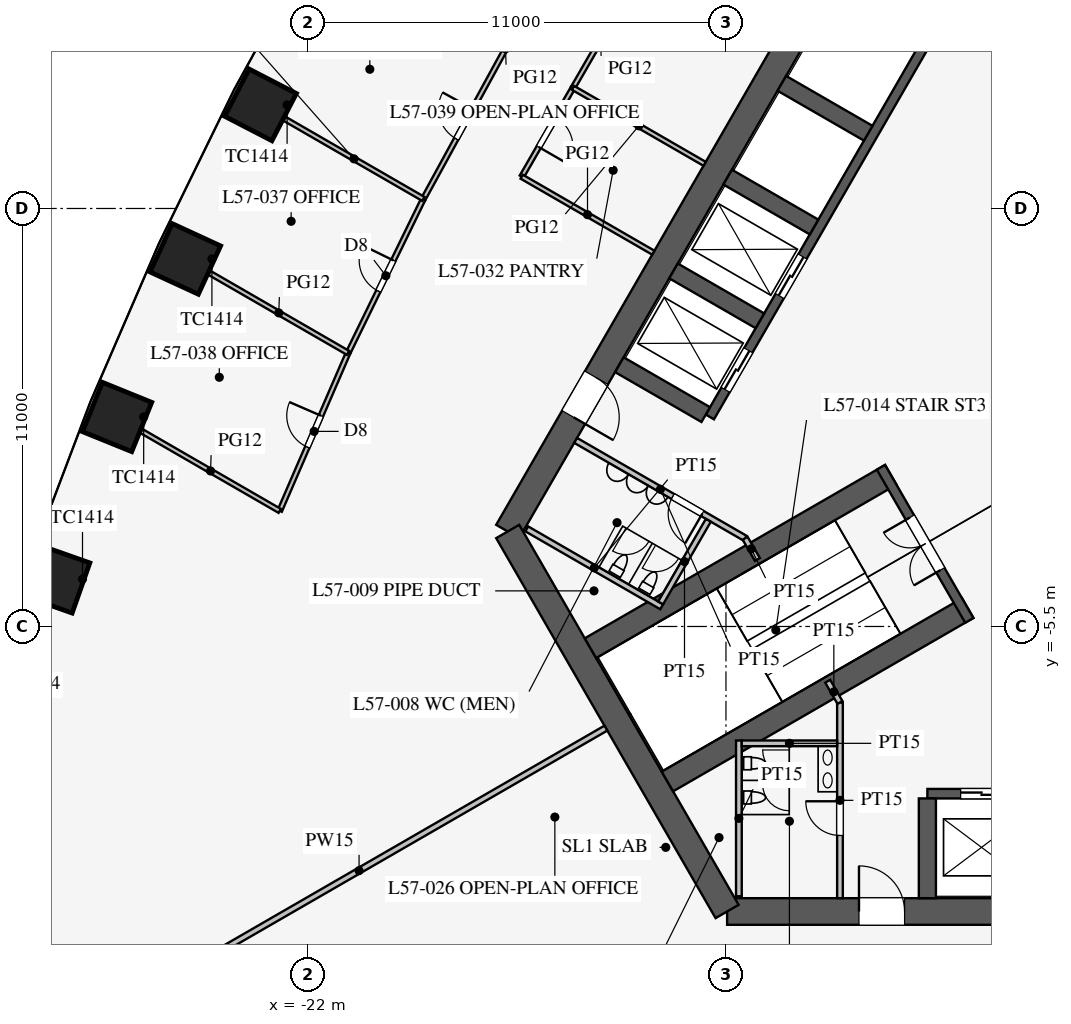
"""IFC4 building model, lengths in metres.
Left out: names, types, materials, properties, quantities, classifications, styles, units other than length and angle.
Written with IfcOpenShell. Run it as: python <this file> out.ifc"""

import sys

from ifc_helpers import new_model, si_unit, direction, frame, frame_2d, origin, origin_2d, place, context, subcontext, project, spatial, rectangle, extrude, element, fill, save


model = new_model("IFC4")
c1 = context("Model", 3, precision=1e-05, world=origin(), true_north=direction((0.0, 1.0)))
c2 = subcontext(c1, "Body", "Model", "MODEL_VIEW")
j1 = project(units=[si_unit("LENGTHUNIT", "METRE"), si_unit("PLANEANGLEUNIT", "RADIAN")], contexts=[c1])
p1 = place(None, origin())
s1 = spatial("IfcSite", under=j1, at=p1, CompositionType="ELEMENT")
p2 = place(p1, origin())
s2 = spatial("IfcBuilding", under=s1, at=p2, CompositionType="ELEMENT")
p3 = place(p2, frame((0.0, 0.0, 248.5)))
s3 = spatial("IfcBuildingStorey", under=s2, at=p3, CompositionType="ELEMENT", Elevation=248.5)
for number, where, z_axis, x_axis in (
    (1, (-23.248, 8.226, 0.0), (0.0, 0.0, 1.0), (-0.46, -0.888, 0.0)),
    (2, (-25.227, 4.172, 0.0), (0.0, 0.0, 1.0), (-0.418, -0.908, 0.0)),
    (3, (-27.022, 0.013, 0.0), (0.0, 0.0, 1.0), (-0.376, -0.927, 0.0)),
    (4, (-28.632, -4.254, 0.0), (0.0, 0.0, 1.0), (-0.332, -0.943, 0.0)),
):
    element("IfcColumn", number, at=place(p3, frame(where, z_axis=z_axis, x_axis=x_axis)), inside=s3, PredefinedType="COLUMN", context=c2, shape_type="SweptSolid", body=[
        extrude(rectangle(XDim=1.4, YDim=1.4, at=origin_2d()), origin(), (0.0, 0.0, 1.0), 4.2),
    ])
p4 = place(p3, frame((-10.97, -13.0, 0.0), z_axis=(0.0, 0.0, 1.0), x_axis=(1.0, 0.0, 0.0)))
e5 = element("IfcWall", 5, at=p4, inside=s3, PredefinedType="SHEAR", context=c2, shape_type="SweptSolid", body=[
    extrude(rectangle(XDim=21.939, YDim=0.7, at=frame_2d((10.97, 0.0))), origin(), (0.0, 0.0, 1.0), 4.2),
])
p5 = place(p4, frame((17.27, 0.0, 0.0)))
e6 = element("IfcOpeningElement", 6, at=p5, cuts=e5, PredefinedType="OPENING", context=c2, shape_type="SweptSolid", body=[
    extrude(rectangle(XDim=1.2, YDim=2.1, at=frame_2d((0.6, 1.05))), frame((0.0, 0.36, 0.0), z_axis=(0.0, -1.0, 0.0), x_axis=(1.0, 0.0, 0.0)), (0.0, 0.0, 1.0), 0.72),
])
p6 = place(p4, frame((3.47, 0.0, 0.0)))
e7 = element("IfcOpeningElement", 7, at=p6, cuts=e5, PredefinedType="OPENING", context=c2, shape_type="SweptSolid", body=[
    extrude(rectangle(XDim=1.2, YDim=2.1, at=frame_2d((0.6, 1.05))), frame((0.0, 0.36, 0.0), z_axis=(0.0, -1.0, 0.0), x_axis=(1.0, 0.0, 0.0)), (0.0, 0.0, 1.0), 0.72),
])
p7 = place(p3, frame((-5.773, 16.0, 0.0), z_axis=(0.0, 0.0, 1.0), x_axis=(-0.500002442456, -0.866023993627, 0.0)))
e8 = element("IfcWall", 8, at=p7, inside=s3, PredefinedType="SHEAR", context=c2, shape_type="SweptSolid", body=[
    extrude(rectangle(XDim=21.939, YDim=0.7, at=frame_2d((10.97, 0.0))), origin(), (0.0, 0.0, 1.0), 4.2),
])
p8 = place(p7, frame((17.27, 0.0, 0.0)))
e9 = element("IfcOpeningElement", 9, at=p8, cuts=e8, PredefinedType="OPENING", context=c2, shape_type="SweptSolid", body=[
    extrude(rectangle(XDim=1.2, YDim=2.1, at=frame_2d((0.6, 1.05))), frame((0.0, 0.36, 0.0), z_axis=(0.0, -1.0, 0.0), x_axis=(1.0, 0.0, 0.0)), (0.0, 0.0, 1.0), 0.72),
])
p9 = place(p7, frame((3.47, 0.0, 0.0)))
e10 = element("IfcOpeningElement", 10, at=p9, cuts=e8, PredefinedType="OPENING", context=c2, shape_type="SweptSolid", body=[
    extrude(rectangle(XDim=1.2, YDim=2.1, at=frame_2d((0.6, 1.05))), frame((0.0, 0.36, 0.0), z_axis=(0.0, -1.0, 0.0), x_axis=(1.0, 0.0, 0.0)), (0.0, 0.0, 1.0), 0.72),
])
p10 = place(p3, frame((-16.743, -3.0, 0.0), z_axis=(0.0, 0.0, 1.0), x_axis=(0.499995765644, -0.866027848477, 0.0)))
e11 = element("IfcWall", 11, at=p10, inside=s3, PredefinedType="SHEAR", context=c2, shape_type="SweptSolid", body=[
    extrude(rectangle(XDim=11.547, YDim=0.7, at=frame_2d((5.773, 0.0))), origin(), (0.0, 0.0, 1.0), 4.2),
])
p11 = place(p3, frame((-5.7, -9.9, 0.0), z_axis=(0.0, 0.0, 1.0), x_axis=(1.0, 0.0, 0.0)))
e12 = element("IfcWall", 12, at=p11, inside=s3, PredefinedType="SHEAR", context=c2, shape_type="SweptSolid", body=[
    extrude(rectangle(XDim=11.4, YDim=0.25, at=frame_2d((5.7, 0.0))), origin(), (0.0, 0.0, 1.0), 4.2),
])
p12 = place(p11, frame((0.875, 0.0, 0.0)))
e13 = element("IfcOpeningElement", 13, at=p12, cuts=e12, PredefinedType="OPENING", context=c2, shape_type="SweptSolid", body=[
    extrude(rectangle(XDim=1.1, YDim=2.2, at=frame_2d((0.55, 1.1))), frame((0.0, 0.135, 0.0), z_axis=(0.0, -1.0, 0.0), x_axis=(1.0, 0.0, 0.0)), (0.0, 0.0, 1.0), 0.27),
])
p13 = place(p11, frame((3.725, 0.0, 0.0)))
e14 = element("IfcOpeningElement", 14, at=p13, cuts=e12, PredefinedType="OPENING", context=c2, shape_type="SweptSolid", body=[
    extrude(rectangle(XDim=1.1, YDim=2.2, at=frame_2d((0.55, 1.1))), frame((0.0, 0.135, 0.0), z_axis=(0.0, -1.0, 0.0), x_axis=(1.0, 0.0, 0.0)), (0.0, 0.0, 1.0), 0.27),
])
p14 = place(p11, frame((6.575, 0.0, 0.0)))
e15 = element("IfcOpeningElement", 15, at=p14, cuts=e12, PredefinedType="OPENING", context=c2, shape_type="SweptSolid", body=[
    extrude(rectangle(XDim=1.1, YDim=2.2, at=frame_2d((0.55, 1.1))), frame((0.0, 0.135, 0.0), z_axis=(0.0, -1.0, 0.0), x_axis=(1.0, 0.0, 0.0)), (0.0, 0.0, 1.0), 0.27),
])
p15 = place(p11, frame((9.425, 0.0, 0.0)))
e16 = element("IfcOpeningElement", 16, at=p15, cuts=e12, PredefinedType="OPENING", context=c2, shape_type="SweptSolid", body=[
    extrude(rectangle(XDim=1.1, YDim=2.2, at=frame_2d((0.55, 1.1))), frame((0.0, 0.135, 0.0), z_axis=(0.0, -1.0, 0.0), x_axis=(1.0, 0.0, 0.0)), (0.0, 0.0, 1.0), 0.27),
])
p16 = place(p3, frame((-5.7, -10.025, 0.0), z_axis=(0.0, 0.0, 1.0), x_axis=(0.0, -1.0, 0.0)))
e17 = element("IfcWall", 17, at=p16, inside=s3, PredefinedType="SHEAR", context=c2, shape_type="SweptSolid", body=[
    extrude(rectangle(XDim=2.625, YDim=0.45, at=frame_2d((1.312, 0.0))), origin(), (0.0, 0.0, 1.0), 4.2),
])
p17 = place(p3, frame((-5.724, 9.886, 0.0), z_axis=(0.0, 0.0, 1.0), x_axis=(-0.500001763848, -0.866024385424, 0.0)))
e18 = element("IfcWall", 18, at=p17, inside=s3, PredefinedType="SHEAR", context=c2, shape_type="SweptSolid", body=[
    extrude(rectangle(XDim=11.4, YDim=0.25, at=frame_2d((5.7, 0.0))), origin(), (0.0, 0.0, 1.0), 4.2),
])
p18 = place(p17, frame((6.525, 0.0, 0.0)))
e19 = element("IfcOpeningElement", 19, at=p18, cuts=e18, PredefinedType="OPENING", context=c2, shape_type="SweptSolid", body=[
    extrude(rectangle(XDim=1.2, YDim=2.2, at=frame_2d((0.6, 1.1))), frame((0.0, 0.135, 0.0), z_axis=(0.0, -1.0, 0.0), x_axis=(1.0, 0.0, 0.0)), (0.0, 0.0, 1.0), 0.27),
])
p19 = place(p17, frame((9.375, 0.0, 0.0)))
e20 = element("IfcOpeningElement", 20, at=p19, cuts=e18, PredefinedType="OPENING", context=c2, shape_type="SweptSolid", body=[
    extrude(rectangle(XDim=1.2, YDim=2.2, at=frame_2d((0.6, 1.1))), frame((0.0, 0.135, 0.0), z_axis=(0.0, -1.0, 0.0), x_axis=(1.0, 0.0, 0.0)), (0.0, 0.0, 1.0), 0.27),
])
for number, where, z_axis, x_axis in (
    (21, (-7.257, 7.481, 0.0), (0.0, 0.0, 1.0), (-0.866, 0.5, 0.0)),
    (22, (-8.682, 5.012, 0.0), (0.0, 0.0, 1.0), (-0.866, 0.5, 0.0)),
    (23, (-10.107, 2.544, 0.0), (0.0, 0.0, 1.0), (-0.866, 0.5, 0.0)),
    (24, (-11.532, 0.076, 0.0), (0.0, 0.0, 1.0), (-0.866, 0.5, 0.0)),
):
    element("IfcWall", number, at=place(p3, frame(where, z_axis=z_axis, x_axis=x_axis)), inside=s3, PredefinedType="SHEAR", context=c2, shape_type="SweptSolid", body=[
        extrude(rectangle(XDim=2.625, YDim=0.45, at=frame_2d((1.312, 0.0))), origin(), (0.0, 0.0, 1.0), 4.2),
    ])
for number, where, z_axis, x_axis in (
    (25, (-6.663, -1.509, 0.0), (0.0, 0.0, 1.0), (-0.866, -0.5, 0.0)),
    (26, (-4.638, -5.016, 0.0), (0.0, 0.0, 1.0), (-0.866, -0.5, 0.0)),
):
    element("IfcWall", number, at=place(p3, frame(where, z_axis=z_axis, x_axis=x_axis)), inside=s3, PredefinedType="SHEAR", context=c2, shape_type="SweptSolid", body=[
        extrude(rectangle(XDim=9.125, YDim=0.6, at=frame_2d((4.562, 0.0))), origin(), (0.0, 0.0, 1.0), 4.2),
    ])
p20 = place(p3, frame((-6.922, -1.312, 0.0), z_axis=(0.0, 0.0, 1.0), x_axis=(0.499984536904, -0.866034331223, 0.0)))
e27 = element("IfcWall", 27, at=p20, inside=s3, PredefinedType="SHEAR", context=c2, shape_type="SweptSolid", body=[
    extrude(rectangle(XDim=4.65, YDim=0.25, at=frame_2d((2.325, 0.0))), origin(), (0.0, 0.0, 1.0), 4.2),
])
p21 = place(p20, frame((1.525, 0.0, 0.0)))
e28 = element("IfcOpeningElement", 28, at=p21, cuts=e27, PredefinedType="OPENING", context=c2, shape_type="SweptSolid", body=[
    extrude(rectangle(XDim=1.6, YDim=2.1, at=frame_2d((0.8, 1.05))), frame((0.0, 0.135, 0.0), z_axis=(0.0, -1.0, 0.0), x_axis=(1.0, 0.0, 0.0)), (0.0, 0.0, 1.0), 0.27),
])
p22 = place(p3, frame((-8.0, -7.5, 0.0), z_axis=(0.0, 0.0, 1.0), x_axis=(0.0, -1.0, 0.0)))
e29 = element("IfcWall", 29, at=p22, inside=s3, PredefinedType="PARTITIONING", context=c2, shape_type="SweptSolid", body=[
    extrude(rectangle(XDim=5.15, YDim=0.15, at=frame_2d((2.575, 0.0))), origin(), (0.0, 0.0, 1.0), 4.0),
])
p23 = place(p22, frame((2.6, 0.0, 0.0)))
e30 = element("IfcOpeningElement", 30, at=p23, cuts=e29, PredefinedType="OPENING", context=c2, shape_type="SweptSolid", body=[
    extrude(rectangle(XDim=0.9, YDim=2.1, at=frame_2d((0.45, 1.05))), frame((0.0, 0.085, 0.0), z_axis=(0.0, -1.0, 0.0), x_axis=(1.0, 0.0, 0.0)), (0.0, 0.0, 1.0), 0.17),
])
p24 = place(p3, frame((-10.495, -3.178, 0.0), z_axis=(0.0, 0.0, 1.0), x_axis=(-0.866037967349, 0.499978238636, 0.0)))
e31 = element("IfcWall", 31, at=p24, inside=s3, PredefinedType="PARTITIONING", context=c2, shape_type="SweptSolid", body=[
    extrude(rectangle(XDim=5.15, YDim=0.15, at=frame_2d((2.575, 0.0))), origin(), (0.0, 0.0, 1.0), 4.0),
])
p25 = place(p24, frame((1.3, 0.0, 0.0)))
e32 = element("IfcOpeningElement", 32, at=p25, cuts=e31, PredefinedType="OPENING", context=c2, shape_type="SweptSolid", body=[
    extrude(rectangle(XDim=0.9, YDim=2.1, at=frame_2d((0.45, 1.05))), frame((0.0, 0.085, 0.0), z_axis=(0.0, -1.0, 0.0), x_axis=(1.0, 0.0, 0.0)), (0.0, 0.0, 1.0), 0.17),
])
for number, where, z_axis, x_axis in (
    (33, (-10.495, -3.178, 0.0), (0.0, 0.0, 1.0), (0.5, -0.866, 0.0)),
    (34, (-8.0, -7.5, 0.0), (0.0, 0.0, 1.0), (-0.5, 0.866, 0.0)),
):
    element("IfcWall", number, at=place(p3, frame(where, z_axis=z_axis, x_axis=x_axis)), inside=s3, PredefinedType="PARTITIONING", context=c2, shape_type="SweptSolid", body=[
        extrude(rectangle(XDim=0.645, YDim=0.15, at=frame_2d((0.323, 0.0))), origin(), (0.0, 0.0, 1.0), 4.0),
    ])
p26 = place(p3, frame((-12.691, -4.982, 0.0), z_axis=(0.0, 0.0, 1.0), x_axis=(-0.8660249478, 0.500000789788, 0.0)))
e35 = element("IfcWall", 35, at=p26, inside=s3, PredefinedType="PARTITIONING", context=c2, shape_type="SweptSolid", body=[
    extrude(rectangle(XDim=4.1, YDim=0.15, at=frame_2d((2.05, 0.0))), origin(), (0.0, 0.0, 1.0), 4.0),
])
p27 = place(p3, frame((-11.464, -2.706, 0.0), z_axis=(0.0, 0.0, 1.0), x_axis=(-0.50001992892, -0.866013897511, 0.0)))
e36 = element("IfcWall", 36, at=p27, inside=s3, PredefinedType="PARTITIONING", context=c2, shape_type="SweptSolid", body=[
    extrude(rectangle(XDim=2.51, YDim=0.15, at=frame_2d((1.255, 0.0))), origin(), (0.0, 0.0, 1.0), 4.0),
])
p28 = place(p3, frame((-10.66, -8.5, 0.0), z_axis=(0.0, 0.0, 1.0), x_axis=(0.0, -1.0, 0.0)))
e37 = element("IfcWall", 37, at=p28, inside=s3, PredefinedType="PARTITIONING", context=c2, shape_type="SweptSolid", body=[
    extrude(rectangle(XDim=4.1, YDim=0.15, at=frame_2d((2.05, 0.0))), origin(), (0.0, 0.0, 1.0), 4.0),
])
p29 = place(p3, frame((-8.075, -8.575, 0.0), z_axis=(0.0, 0.0, 1.0), x_axis=(-1.0, 0.0, 0.0)))
e38 = element("IfcWall", 38, at=p29, inside=s3, PredefinedType="PARTITIONING", context=c2, shape_type="SweptSolid", body=[
    extrude(rectangle(XDim=2.51, YDim=0.15, at=frame_2d((1.255, 0.0))), origin(), (0.0, 0.0, 1.0), 4.0),
])
p30 = place(p3, frame((-14.159, -8.175, 0.0), z_axis=(0.0, 0.0, 1.0), x_axis=(-0.866027028085, -0.499997186618, 0.0)))
e39 = element("IfcWall", 39, at=p30, inside=s3, PredefinedType="PARTITIONING", context=c2, shape_type="SweptSolid", body=[
    extrude(rectangle(XDim=15.0, YDim=0.15, at=frame_2d((7.5, 0.0))), origin(), (0.0, 0.0, 1.0), 2.4),
])
p31 = place(p3, frame((-15.026, 8.675, 0.0), z_axis=(0.0, 0.0, 1.0), x_axis=(-0.4999416173, -0.866059108428, 0.0)))
e40 = element("IfcWall", 40, at=p31, inside=s3, PredefinedType="PARTITIONING", context=c2, shape_type="SweptSolid", body=[
    extrude(rectangle(XDim=2.7, YDim=0.12, at=frame_2d((1.35, 0.0))), origin(), (0.0, 0.0, 1.0), 2.9),
])
p32 = place(p31, frame((0.9, 0.0, 0.15)))
e41 = element("IfcOpeningElement", 41, at=p32, cuts=e40, PredefinedType="OPENING", context=c2, shape_type="SweptSolid", body=[
    extrude(rectangle(XDim=0.9, YDim=2.1, at=frame_2d((0.45, 1.05))), frame((0.0, 0.07, 0.0), z_axis=(0.0, -1.0, 0.0), x_axis=(1.0, 0.0, 0.0)), (0.0, 0.0, 1.0), 0.14),
])
p33 = place(p3, frame((-12.226, 13.525, 0.0), z_axis=(0.0, 0.0, 1.0), x_axis=(-0.500016814911, -0.866015695474, 0.0)))
e42 = element("IfcWall", 42, at=p33, inside=s3, PredefinedType="PARTITIONING", context=c2, shape_type="SweptSolid", body=[
    extrude(rectangle(XDim=5.6, YDim=0.12, at=frame_2d((2.8, 0.0))), origin(), (0.0, 0.0, 1.0), 2.9),
])
p34 = place(p33, frame((2.3, 0.0, 0.15)))
e43 = element("IfcOpeningElement", 43, at=p34, cuts=e42, PredefinedType="OPENING", context=c2, shape_type="SweptSolid", body=[
    extrude(rectangle(XDim=1.0, YDim=2.1, at=frame_2d((0.5, 1.05))), frame((0.0, 0.07, 0.0), z_axis=(0.0, -1.0, 0.0), x_axis=(1.0, 0.0, 0.0)), (0.0, 0.0, 1.0), 0.14),
])
for number, where, z_axis, x_axis in (
    (44, (-12.911, 4.337, 0.0), (0.0, 0.0, 1.0), (-0.866, 0.5, 0.0)),
    (45, (-11.562, 6.675, 0.0), (0.0, 0.0, 1.0), (-0.866, 0.5, 0.0)),
):
    element("IfcWall", number, at=place(p3, frame(where, z_axis=z_axis, x_axis=x_axis)), inside=s3, PredefinedType="PARTITIONING", context=c2, shape_type="SweptSolid", body=[
        extrude(rectangle(XDim=4.0, YDim=0.12, at=frame_2d((2.0, 0.0))), origin(), (0.0, 0.0, 1.0), 2.9),
    ])
p35 = place(p3, frame((-16.802, 9.7, 0.0), z_axis=(0.0, 0.0, 1.0), x_axis=(-0.479949984371, -0.877295852322, 0.0)))
e46 = element("IfcWall", 46, at=p35, inside=s3, PredefinedType="PARTITIONING", context=c2, shape_type="SweptSolid", body=[
    extrude(rectangle(XDim=4.501, YDim=0.12, at=frame_2d((2.25, 0.0))), origin(), (0.0, 0.0, 1.0), 2.9),
])
p36 = place(p35, frame((1.8, 0.0, 0.15)))
e47 = element("IfcOpeningElement", 47, at=p36, cuts=e46, PredefinedType="OPENING", context=c2, shape_type="SweptSolid", body=[
    extrude(rectangle(XDim=0.9, YDim=2.1, at=frame_2d((0.45, 1.05))), frame((0.0, 0.07, 0.0), z_axis=(0.0, -1.0, 0.0), x_axis=(1.0, 0.0, 0.0)), (0.0, 0.0, 1.0), 0.14),
])
p37 = place(p3, frame((-18.962, 5.751, 0.0), z_axis=(0.0, 0.0, 1.0), x_axis=(-0.43911984878, -0.898428493764, 0.0)))
e48 = element("IfcWall", 48, at=p37, inside=s3, PredefinedType="PARTITIONING", context=c2, shape_type="SweptSolid", body=[
    extrude(rectangle(XDim=4.511, YDim=0.12, at=frame_2d((2.255, 0.0))), origin(), (0.0, 0.0, 1.0), 2.9),
])
p38 = place(p37, frame((1.8, 0.0, 0.15)))
e49 = element("IfcOpeningElement", 49, at=p38, cuts=e48, PredefinedType="OPENING", context=c2, shape_type="SweptSolid", body=[
    extrude(rectangle(XDim=0.9, YDim=2.1, at=frame_2d((0.45, 1.05))), frame((0.0, 0.07, 0.0), z_axis=(0.0, -1.0, 0.0), x_axis=(1.0, 0.0, 0.0)), (0.0, 0.0, 1.0), 0.14),
])
p39 = place(p3, frame((-20.943, 1.699, 0.0), z_axis=(0.0, 0.0, 1.0), x_axis=(-0.397253491631, -0.917708920839, 0.0)))
e50 = element("IfcWall", 50, at=p39, inside=s3, PredefinedType="PARTITIONING", context=c2, shape_type="SweptSolid", body=[
    extrude(rectangle(XDim=4.53, YDim=0.12, at=frame_2d((2.265, 0.0))), origin(), (0.0, 0.0, 1.0), 2.9),
])
p40 = place(p39, frame((1.8, 0.0, 0.15)))
e51 = element("IfcOpeningElement", 51, at=p40, cuts=e50, PredefinedType="OPENING", context=c2, shape_type="SweptSolid", body=[
    extrude(rectangle(XDim=0.9, YDim=2.1, at=frame_2d((0.45, 1.05))), frame((0.0, 0.07, 0.0), z_axis=(0.0, -1.0, 0.0), x_axis=(1.0, 0.0, 0.0)), (0.0, 0.0, 1.0), 0.14),
])
p41 = place(p3, frame((-22.742, -2.458, 0.0), z_axis=(0.0, 0.0, 1.0), x_axis=(-0.866033799337, 0.499985458195, 0.0)))
e52 = element("IfcWall", 52, at=p41, inside=s3, PredefinedType="PARTITIONING", context=c2, shape_type="SweptSolid", body=[
    extrude(rectangle(XDim=4.205, YDim=0.12, at=frame_2d((2.103, 0.0))), origin(), (0.0, 0.0, 1.0), 2.8),
])
p42 = place(p3, frame((-18.962, 5.751, 0.0), z_axis=(0.0, 0.0, 1.0), x_axis=(-0.866037167642, 0.499979623848, 0.0)))
e53 = element("IfcWall", 53, at=p42, inside=s3, PredefinedType="PARTITIONING", context=c2, shape_type="SweptSolid", body=[
    extrude(rectangle(XDim=4.219, YDim=0.12, at=frame_2d((2.109, 0.0))), origin(), (0.0, 0.0, 1.0), 2.9),
])
p43 = place(p3, frame((-20.943, 1.699, 0.0), z_axis=(0.0, 0.0, 1.0), x_axis=(-0.866041823485, 0.499971559166, 0.0)))
e54 = element("IfcWall", 54, at=p43, inside=s3, PredefinedType="PARTITIONING", context=c2, shape_type="SweptSolid", body=[
    extrude(rectangle(XDim=4.214, YDim=0.12, at=frame_2d((2.107, 0.0))), origin(), (0.0, 0.0, 1.0), 2.9),
])
p44 = place(p23, frame((0.9, 0.0, 0.0), z_axis=(0.0, 0.0, 1.0), x_axis=(-1.0, 0.0, 0.0)))
e55 = element("IfcDoor", 55, at=p44, inside=s3, OperationType="SINGLE_SWING_RIGHT", PredefinedType="DOOR", context=c2, shape_type="SweptSolid", body=[
    extrude(rectangle(XDim=0.9, YDim=2.1, at=frame_2d((0.45, 1.05))), frame((0.0, 0.025, 0.0), z_axis=(0.0, -1.0, 0.0), x_axis=(1.0, 0.0, 0.0)), (0.0, 0.0, 1.0), 0.05),
])
fill(e30, e55)
p45 = place(p25, origin())
e56 = element("IfcDoor", 56, at=p45, inside=s3, OperationType="SINGLE_SWING_LEFT", PredefinedType="DOOR", context=c2, shape_type="SweptSolid", body=[
    extrude(rectangle(XDim=0.9, YDim=2.1, at=frame_2d((0.45, 1.05))), frame((0.0, 0.025, 0.0), z_axis=(0.0, -1.0, 0.0), x_axis=(1.0, 0.0, 0.0)), (0.0, 0.0, 1.0), 0.05),
])
fill(e32, e56)
p46 = place(p21, frame((1.6, 0.0, 0.0), z_axis=(0.0, 0.0, 1.0), x_axis=(-1.0, 0.0, 0.0)))
e57 = element("IfcDoor", 57, at=p46, inside=s3, OperationType="DOUBLE_DOOR_SINGLE_SWING", PredefinedType="DOOR", context=c2, shape_type="SweptSolid", body=[
    extrude(rectangle(XDim=1.6, YDim=2.1, at=frame_2d((0.8, 1.05))), frame((0.0, 0.025, 0.0), z_axis=(0.0, -1.0, 0.0), x_axis=(1.0, 0.0, 0.0)), (0.0, 0.0, 1.0), 0.05),
])
fill(e28, e57)
p47 = place(p6, origin())
e58 = element("IfcDoor", 58, at=p47, inside=s3, OperationType="SINGLE_SWING_LEFT", PredefinedType="DOOR", context=c2, shape_type="SweptSolid", body=[
    extrude(rectangle(XDim=1.2, YDim=2.1, at=frame_2d((0.6, 1.05))), frame((0.0, 0.025, 0.0), z_axis=(0.0, -1.0, 0.0), x_axis=(1.0, 0.0, 0.0)), (0.0, 0.0, 1.0), 0.05),
])
fill(e7, e58)
p48 = place(p8, origin())
e59 = element("IfcDoor", 59, at=p48, inside=s3, OperationType="SINGLE_SWING_RIGHT", PredefinedType="DOOR", context=c2, shape_type="SweptSolid", body=[
    extrude(rectangle(XDim=1.2, YDim=2.1, at=frame_2d((0.6, 1.05))), frame((0.0, 0.025, 0.0), z_axis=(0.0, -1.0, 0.0), x_axis=(1.0, 0.0, 0.0)), (0.0, 0.0, 1.0), 0.05),
])
fill(e9, e59)
p49 = place(p32, origin())
e60 = element("IfcDoor", 60, at=p49, inside=s3, OperationType="SINGLE_SWING_RIGHT", PredefinedType="DOOR", context=c2, shape_type="SweptSolid", body=[
    extrude(rectangle(XDim=0.9, YDim=2.1, at=frame_2d((0.45, 1.05))), frame((0.0, 0.025, 0.0), z_axis=(0.0, -1.0, 0.0), x_axis=(1.0, 0.0, 0.0)), (0.0, 0.0, 1.0), 0.05),
])
fill(e41, e60)
p50 = place(p36, frame((0.9, 0.0, 0.0), z_axis=(0.0, 0.0, 1.0), x_axis=(-1.0, 0.0, 0.0)))
e61 = element("IfcDoor", 61, at=p50, inside=s3, OperationType="SINGLE_SWING_RIGHT", PredefinedType="DOOR", context=c2, shape_type="SweptSolid", body=[
    extrude(rectangle(XDim=0.9, YDim=2.1, at=frame_2d((0.45, 1.05))), frame((0.0, 0.025, 0.0), z_axis=(0.0, -1.0, 0.0), x_axis=(1.0, 0.0, 0.0)), (0.0, 0.0, 1.0), 0.05),
])
fill(e47, e61)
p51 = place(p38, frame((0.9, 0.0, 0.0), z_axis=(0.0, 0.0, 1.0), x_axis=(-1.0, 0.0, 0.0)))
e62 = element("IfcDoor", 62, at=p51, inside=s3, OperationType="SINGLE_SWING_RIGHT", PredefinedType="DOOR", context=c2, shape_type="SweptSolid", body=[
    extrude(rectangle(XDim=0.9, YDim=2.1, at=frame_2d((0.45, 1.05))), frame((0.0, 0.025, 0.0), z_axis=(0.0, -1.0, 0.0), x_axis=(1.0, 0.0, 0.0)), (0.0, 0.0, 1.0), 0.05),
])
fill(e49, e62)
p52 = place(p40, frame((0.9, 0.0, 0.0), z_axis=(0.0, 0.0, 1.0), x_axis=(-1.0, 0.0, 0.0)))
e63 = element("IfcDoor", 63, at=p52, inside=s3, OperationType="SINGLE_SWING_RIGHT", PredefinedType="DOOR", context=c2, shape_type="SweptSolid", body=[
    extrude(rectangle(XDim=0.9, YDim=2.1, at=frame_2d((0.45, 1.05))), frame((0.0, 0.025, 0.0), z_axis=(0.0, -1.0, 0.0), x_axis=(1.0, 0.0, 0.0)), (0.0, 0.0, 1.0), 0.05),
])
fill(e51, e63)
p53 = place(p12, origin())
e64 = element("IfcDoor", 64, at=p53, inside=s3, OperationType="DOUBLE_DOOR_SLIDING", PredefinedType="DOOR", context=c2, shape_type="SweptSolid", body=[
    extrude(rectangle(XDim=1.1, YDim=2.2, at=frame_2d((0.55, 1.1))), frame((0.0, 0.025, 0.0), z_axis=(0.0, -1.0, 0.0), x_axis=(1.0, 0.0, 0.0)), (0.0, 0.0, 1.0), 0.05),
])
fill(e13, e64)
p54 = place(p18, origin())
e65 = element("IfcDoor", 65, at=p54, inside=s3, OperationType="DOUBLE_DOOR_SLIDING", PredefinedType="DOOR", context=c2, shape_type="SweptSolid", body=[
    extrude(rectangle(XDim=1.2, YDim=2.2, at=frame_2d((0.6, 1.1))), frame((0.0, 0.025, 0.0), z_axis=(0.0, -1.0, 0.0), x_axis=(1.0, 0.0, 0.0)), (0.0, 0.0, 1.0), 0.05),
])
fill(e19, e65)
p55 = place(p19, origin())
e66 = element("IfcDoor", 66, at=p55, inside=s3, OperationType="DOUBLE_DOOR_SLIDING", PredefinedType="DOOR", context=c2, shape_type="SweptSolid", body=[
    extrude(rectangle(XDim=1.2, YDim=2.2, at=frame_2d((0.6, 1.1))), frame((0.0, 0.025, 0.0), z_axis=(0.0, -1.0, 0.0), x_axis=(1.0, 0.0, 0.0)), (0.0, 0.0, 1.0), 0.05),
])
fill(e20, e66)
save(model, sys.argv[1])
